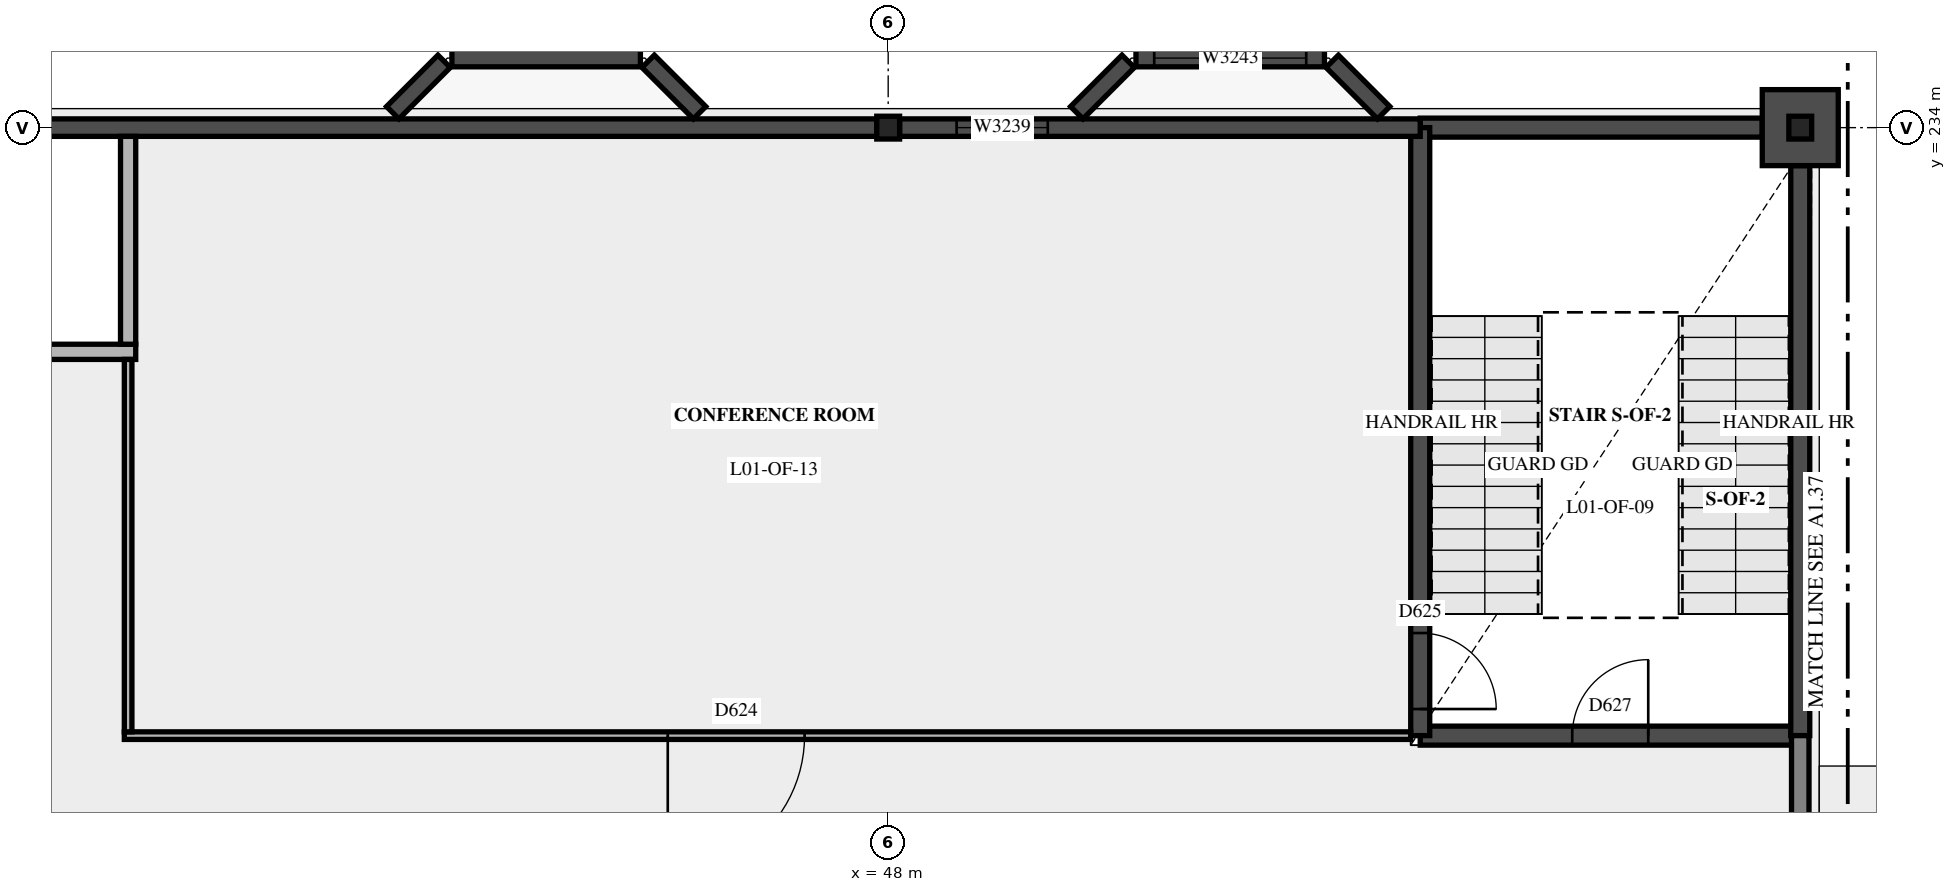
"""IFC4 building model, lengths in metres.
Left out: names, types, materials, properties, quantities, classifications, styles, units other than length and angle.
Written with IfcOpenShell. Run it as: python <this file> out.ifc"""

import sys

from ifc_helpers import new_model, si_unit, direction, frame, frame_2d, origin, origin_2d, place, context, subcontext, project, spatial, rectangle, i_section, extrude, element, fill, save


model = new_model("IFC4")
c1 = context("Model", 3, precision=1e-05, world=origin(), true_north=direction((0.0, 1.0)))
c2 = subcontext(c1, "Body", "Model", "MODEL_VIEW")
j1 = project(units=[si_unit("LENGTHUNIT", "METRE"), si_unit("PLANEANGLEUNIT", "RADIAN")], contexts=[c1])
p1 = place(None, origin())
s1 = spatial("IfcSite", under=j1, at=p1, CompositionType="ELEMENT")
p2 = place(p1, origin())
s2 = spatial("IfcBuilding", under=s1, at=p2, CompositionType="ELEMENT")
p3 = place(p2, frame((0.0, 0.0, 5.4)))
s3 = spatial("IfcBuildingStorey", under=s2, at=p3, CompositionType="ELEMENT", Elevation=5.4)
for number, where, z_axis, x_axis in (
    (1, (48.0, 234.0, 0.0), (0.0, 0.0, 1.0), (1.0, 0.0, 0.0)),
    (2, (60.0, 234.0, 0.0), (0.0, 0.0, 1.0), (1.0, 0.0, 0.0)),
):
    element("IfcColumn", number, at=place(p3, frame(where, z_axis=z_axis, x_axis=x_axis)), inside=s3, PredefinedType="COLUMN", context=c2, shape_type="SweptSolid", body=[
        extrude(i_section(OverallWidth=0.3, OverallDepth=0.3, WebThickness=0.011, FlangeThickness=0.019, at=origin_2d()), origin(), (0.0, 0.0, 1.0), 5.4),
    ])
p4 = place(p3, frame((55.0, 226.0, 0.0), z_axis=(0.0, 0.0, 1.0), x_axis=(1.0, 0.0, 0.0)))
e3 = element("IfcWall", 3, at=p4, inside=s3, PredefinedType="SHEAR", context=c2, shape_type="SweptSolid", body=[
    extrude(rectangle(XDim=5.0, YDim=0.25, at=frame_2d((2.5, 0.0))), origin(), (0.0, 0.0, 1.0), 5.4),
])
p5 = place(p4, frame((2.0, 0.0, 0.0)))
e4 = element("IfcOpeningElement", 4, at=p5, cuts=e3, PredefinedType="OPENING", context=c2, shape_type="SweptSolid", body=[
    extrude(rectangle(XDim=1.0, YDim=2.1, at=frame_2d((0.5, 1.05))), frame((0.0, 0.135, 0.0), z_axis=(0.0, -1.0, 0.0), x_axis=(1.0, 0.0, 0.0)), (0.0, 0.0, 1.0), 0.27),
])
p6 = place(p3, frame((60.0, 226.0, 0.0), z_axis=(0.0, 0.0, 1.0), x_axis=(0.0, 1.0, 0.0)))
e5 = element("IfcWall", 5, at=p6, inside=s3, PredefinedType="SHEAR", context=c2, shape_type="SweptSolid", body=[
    extrude(rectangle(XDim=7.5, YDim=0.25, at=frame_2d((3.75, 0.0))), origin(), (0.0, 0.0, 1.0), 5.4),
])
p7 = place(p3, frame((55.0, 234.0, 0.0), z_axis=(0.0, 0.0, 1.0), x_axis=(1.0, 0.0, 0.0)))
e6 = element("IfcWall", 6, at=p7, inside=s3, PredefinedType="SHEAR", context=c2, shape_type="SweptSolid", body=[
    extrude(rectangle(XDim=4.5, YDim=0.25, at=frame_2d((2.25, 0.0))), origin(), (0.0, 0.0, 1.0), 5.4),
])
p8 = place(p3, frame((55.0, 226.0, 0.0), z_axis=(0.0, 0.0, 1.0), x_axis=(0.0, 1.0, 0.0)))
e7 = element("IfcWall", 7, at=p8, inside=s3, PredefinedType="SHEAR", context=c2, shape_type="SweptSolid", body=[
    extrude(rectangle(XDim=8.0, YDim=0.25, at=frame_2d((4.0, 0.0))), origin(), (0.0, 0.0, 1.0), 5.4),
])
p9 = place(p8, frame((0.35, 0.0, 0.0)))
e8 = element("IfcOpeningElement", 8, at=p9, cuts=e7, PredefinedType="OPENING", context=c2, shape_type="SweptSolid", body=[
    extrude(rectangle(XDim=1.0, YDim=2.1, at=frame_2d((0.5, 1.05))), frame((0.0, 0.135, 0.0), z_axis=(0.0, -1.0, 0.0), x_axis=(1.0, 0.0, 0.0)), (0.0, 0.0, 1.0), 0.27),
])
p10 = place(p3, frame((36.15, 234.0, 0.0), z_axis=(0.0, 0.0, 1.0), x_axis=(1.0, 0.0, 0.0)))
e9 = element("IfcWall", 9, at=p10, inside=s3, PredefinedType="SOLIDWALL", context=c2, shape_type="SweptSolid", body=[
    extrude(rectangle(XDim=11.7, YDim=0.23, at=frame_2d((5.85, 0.0))), origin(), (0.0, 0.0, 1.0), 5.4),
])
p11 = place(p10, frame((6.35, 0.0, 0.75)))
e10 = element("IfcOpeningElement", 10, at=p11, cuts=e9, PredefinedType="OPENING", context=c2, shape_type="SweptSolid", body=[
    extrude(rectangle(XDim=2.0, YDim=2.55, at=frame_2d((1.0, 1.275))), frame((0.0, 0.125, 0.0), z_axis=(0.0, -1.0, 0.0), x_axis=(1.0, 0.0, 0.0)), (0.0, 0.0, 1.0), 0.25),
])
p12 = place(p3, frame((48.15, 234.0, 0.0), z_axis=(0.0, 0.0, 1.0), x_axis=(1.0, 0.0, 0.0)))
e11 = element("IfcWall", 11, at=p12, inside=s3, PredefinedType="SOLIDWALL", context=c2, shape_type="SweptSolid", body=[
    extrude(rectangle(XDim=6.85, YDim=0.23, at=frame_2d((3.425, 0.0))), origin(), (0.0, 0.0, 1.0), 5.4),
])
p13 = place(p12, frame((0.75, 0.0, 0.9)))
e12 = element("IfcOpeningElement", 12, at=p13, cuts=e11, PredefinedType="OPENING", context=c2, shape_type="SweptSolid", body=[
    extrude(rectangle(XDim=1.2, YDim=3.3, at=frame_2d((0.6, 1.65))), frame((0.0, 0.125, 0.0), z_axis=(0.0, -1.0, 0.0), x_axis=(1.0, 0.0, 0.0)), (0.0, 0.0, 1.0), 0.25),
])
p14 = place(p12, frame((3.35, 0.0, 0.75)))
e13 = element("IfcOpeningElement", 13, at=p14, cuts=e11, PredefinedType="OPENING", context=c2, shape_type="SweptSolid", body=[
    extrude(rectangle(XDim=2.0, YDim=2.55, at=frame_2d((1.0, 1.275))), frame((0.0, 0.125, 0.0), z_axis=(0.0, -1.0, 0.0), x_axis=(1.0, 0.0, 0.0)), (0.0, 0.0, 1.0), 0.25),
])
p15 = place(p3, frame((60.0, 222.15, 0.0), z_axis=(0.0, 0.0, 1.0), x_axis=(0.0, 1.0, 0.0)))
e14 = element("IfcWall", 14, at=p15, inside=s3, PredefinedType="SOLIDWALL", context=c2, shape_type="SweptSolid", body=[
    extrude(rectangle(XDim=3.85, YDim=0.23, at=frame_2d((1.925, 0.0))), origin(), (0.0, 0.0, 1.0), 4.7),
])
p16 = place(p3, frame((59.5, 234.0, 0.0), z_axis=(0.0, 0.0, 1.0), x_axis=(1.0, 0.0, 0.0)))
e15 = element("IfcWall", 15, at=p16, inside=s3, PredefinedType="SOLIDWALL", context=c2, shape_type="SweptSolid", body=[
    extrude(rectangle(XDim=1.0, YDim=1.0, at=frame_2d((0.5, 0.0))), origin(), (0.0, 0.0, 1.0), 5.4),
])
p17 = place(p3, frame((41.481, 234.196, 0.75), z_axis=(0.0, 0.0, 1.0), x_axis=(0.707106781187, 0.707106781187, 0.0)))
e16 = element("IfcWall", 16, at=p17, inside=s3, PredefinedType="SOLIDWALL", context=c2, shape_type="SweptSolid", body=[
    extrude(rectangle(XDim=0.956, YDim=0.23, at=frame_2d((0.478, 0.0))), origin(), (0.0, 0.0, 1.0), 2.55),
])
p18 = place(p3, frame((42.26, 234.915, 0.75), z_axis=(0.0, 0.0, 1.0), x_axis=(1.0, 0.0, 0.0)))
e17 = element("IfcWall", 17, at=p18, inside=s3, PredefinedType="SOLIDWALL", context=c2, shape_type="SweptSolid", body=[
    extrude(rectangle(XDim=2.48, YDim=0.23, at=frame_2d((1.24, 0.0))), origin(), (0.0, 0.0, 1.0), 2.55),
])
p19 = place(p3, frame((44.843, 234.873, 0.75), z_axis=(0.0, 0.0, 1.0), x_axis=(0.707106781187, -0.707106781187, 0.0)))
e18 = element("IfcWall", 18, at=p19, inside=s3, PredefinedType="SOLIDWALL", context=c2, shape_type="SweptSolid", body=[
    extrude(rectangle(XDim=0.956, YDim=0.23, at=frame_2d((0.478, 0.0))), origin(), (0.0, 0.0, 1.0), 2.55),
])
for number, where, z_axis, x_axis in (
    (19, (41.45, 234.195, 0.05), (0.0, 0.0, 1.0), (1.0, 0.0, 0.0)),
    (20, (45.05, 234.195, 0.05), (0.0, 0.0, 1.0), (1.0, 0.0, 0.0)),
):
    element("IfcWall", number, at=place(p3, frame(where, z_axis=z_axis, x_axis=x_axis)), inside=s3, PredefinedType="SOLIDWALL", context=c2, shape_type="SweptSolid", body=[
        extrude(rectangle(XDim=0.5, YDim=0.16, at=frame_2d((0.25, 0.0))), origin(), (0.0, 0.0, 1.0), 0.18),
    ])
for number, where, z_axis, x_axis in (
    (21, (41.45, 234.285, 0.23), (0.0, 0.0, 1.0), (1.0, 0.0, 0.0)),
    (22, (45.05, 234.285, 0.23), (0.0, 0.0, 1.0), (1.0, 0.0, 0.0)),
):
    element("IfcWall", number, at=place(p3, frame(where, z_axis=z_axis, x_axis=x_axis)), inside=s3, PredefinedType="SOLIDWALL", context=c2, shape_type="SweptSolid", body=[
        extrude(rectangle(XDim=0.5, YDim=0.34, at=frame_2d((0.25, 0.0))), origin(), (0.0, 0.0, 1.0), 0.18),
    ])
for number, where, z_axis, x_axis in (
    (23, (41.45, 234.365, 0.41), (0.0, 0.0, 1.0), (1.0, 0.0, 0.0)),
    (24, (45.05, 234.365, 0.41), (0.0, 0.0, 1.0), (1.0, 0.0, 0.0)),
):
    element("IfcWall", number, at=place(p3, frame(where, z_axis=z_axis, x_axis=x_axis)), inside=s3, PredefinedType="SOLIDWALL", context=c2, shape_type="SweptSolid", body=[
        extrude(rectangle(XDim=0.5, YDim=0.5, at=frame_2d((0.25, 0.0))), origin(), (0.0, 0.0, 1.0), 0.18),
    ])
p20 = place(p3, frame((50.481, 234.196, 0.75), z_axis=(0.0, 0.0, 1.0), x_axis=(0.707106781187, 0.707106781187, 0.0)))
e25 = element("IfcWall", 25, at=p20, inside=s3, PredefinedType="SOLIDWALL", context=c2, shape_type="SweptSolid", body=[
    extrude(rectangle(XDim=0.956, YDim=0.23, at=frame_2d((0.478, 0.0))), origin(), (0.0, 0.0, 1.0), 2.55),
])
p21 = place(p3, frame((51.26, 234.915, 0.75), z_axis=(0.0, 0.0, 1.0), x_axis=(1.0, 0.0, 0.0)))
e26 = element("IfcWall", 26, at=p21, inside=s3, PredefinedType="SOLIDWALL", context=c2, shape_type="SweptSolid", body=[
    extrude(rectangle(XDim=2.48, YDim=0.23, at=frame_2d((1.24, 0.0))), origin(), (0.0, 0.0, 1.0), 2.55),
])
p22 = place(p21, frame((0.24, 0.0, 0.15)))
e27 = element("IfcOpeningElement", 27, at=p22, cuts=e26, PredefinedType="OPENING", context=c2, shape_type="SweptSolid", body=[
    extrude(rectangle(XDim=2.0, YDim=2.1, at=frame_2d((1.0, 1.05))), frame((0.0, 0.125, 0.0), z_axis=(0.0, -1.0, 0.0), x_axis=(1.0, 0.0, 0.0)), (0.0, 0.0, 1.0), 0.25),
])
p23 = place(p3, frame((53.843, 234.873, 0.75), z_axis=(0.0, 0.0, 1.0), x_axis=(0.707106781187, -0.707106781187, 0.0)))
e28 = element("IfcWall", 28, at=p23, inside=s3, PredefinedType="SOLIDWALL", context=c2, shape_type="SweptSolid", body=[
    extrude(rectangle(XDim=0.956, YDim=0.23, at=frame_2d((0.478, 0.0))), origin(), (0.0, 0.0, 1.0), 2.55),
])
for number, where, z_axis, x_axis in (
    (29, (50.45, 234.195, 0.05), (0.0, 0.0, 1.0), (1.0, 0.0, 0.0)),
    (30, (54.05, 234.195, 0.05), (0.0, 0.0, 1.0), (1.0, 0.0, 0.0)),
):
    element("IfcWall", number, at=place(p3, frame(where, z_axis=z_axis, x_axis=x_axis)), inside=s3, PredefinedType="SOLIDWALL", context=c2, shape_type="SweptSolid", body=[
        extrude(rectangle(XDim=0.5, YDim=0.16, at=frame_2d((0.25, 0.0))), origin(), (0.0, 0.0, 1.0), 0.18),
    ])
for number, where, z_axis, x_axis in (
    (31, (50.45, 234.285, 0.23), (0.0, 0.0, 1.0), (1.0, 0.0, 0.0)),
    (32, (54.05, 234.285, 0.23), (0.0, 0.0, 1.0), (1.0, 0.0, 0.0)),
):
    element("IfcWall", number, at=place(p3, frame(where, z_axis=z_axis, x_axis=x_axis)), inside=s3, PredefinedType="SOLIDWALL", context=c2, shape_type="SweptSolid", body=[
        extrude(rectangle(XDim=0.5, YDim=0.34, at=frame_2d((0.25, 0.0))), origin(), (0.0, 0.0, 1.0), 0.18),
    ])
for number, where, z_axis, x_axis in (
    (33, (50.45, 234.365, 0.41), (0.0, 0.0, 1.0), (1.0, 0.0, 0.0)),
    (34, (54.05, 234.365, 0.41), (0.0, 0.0, 1.0), (1.0, 0.0, 0.0)),
):
    element("IfcWall", number, at=place(p3, frame(where, z_axis=z_axis, x_axis=x_axis)), inside=s3, PredefinedType="SOLIDWALL", context=c2, shape_type="SweptSolid", body=[
        extrude(rectangle(XDim=0.5, YDim=0.5, at=frame_2d((0.25, 0.0))), origin(), (0.0, 0.0, 1.0), 0.18),
    ])
p24 = place(p3, frame((37.95, 226.0, 0.0), z_axis=(0.0, 0.0, 1.0), x_axis=(1.0, 0.0, 0.0)))
e35 = element("IfcWall", 35, at=p24, inside=s3, PredefinedType="PARTITIONING", context=c2, shape_type="SweptSolid", body=[
    extrude(rectangle(XDim=16.925, YDim=0.1, at=frame_2d((8.462, 0.0))), origin(), (0.0, 0.0, 1.0), 4.7),
])
p25 = place(p24, frame((7.15, 0.0, 0.0)))
e36 = element("IfcOpeningElement", 36, at=p25, cuts=e35, PredefinedType="OPENING", context=c2, shape_type="SweptSolid", body=[
    extrude(rectangle(XDim=1.8, YDim=2.1, at=frame_2d((0.9, 1.05))), frame((0.0, 0.06, 0.0), z_axis=(0.0, -1.0, 0.0), x_axis=(1.0, 0.0, 0.0)), (0.0, 0.0, 1.0), 0.12),
])
p26 = place(p3, frame((32.275, 231.05, 0.0), z_axis=(0.0, 0.0, 1.0), x_axis=(1.0, 0.0, 0.0)))
e37 = element("IfcWall", 37, at=p26, inside=s3, PredefinedType="PARTITIONING", context=c2, shape_type="SweptSolid", body=[
    extrude(rectangle(XDim=5.825, YDim=0.2, at=frame_2d((2.913, 0.0))), origin(), (0.0, 0.0, 1.0), 4.7),
])
p27 = place(p26, frame((2.3, 0.0, 0.0)))
e38 = element("IfcOpeningElement", 38, at=p27, cuts=e37, PredefinedType="OPENING", context=c2, shape_type="SweptSolid", body=[
    extrude(rectangle(XDim=1.0, YDim=2.1, at=frame_2d((0.5, 1.05))), frame((0.0, 0.11, 0.0), z_axis=(0.0, -1.0, 0.0), x_axis=(1.0, 0.0, 0.0)), (0.0, 0.0, 1.0), 0.22),
])
p28 = place(p3, frame((38.0, 226.05, 0.0), z_axis=(0.0, 0.0, 1.0), x_axis=(0.0, 1.0, 0.0)))
e39 = element("IfcWall", 39, at=p28, inside=s3, PredefinedType="PARTITIONING", context=c2, shape_type="SweptSolid", body=[
    extrude(rectangle(XDim=4.9, YDim=0.1, at=frame_2d((2.45, 0.0))), origin(), (0.0, 0.0, 1.0), 5.15),
])
p29 = place(p3, frame((38.0, 231.15, 0.0), z_axis=(0.0, 0.0, 1.0), x_axis=(0.0, 1.0, 0.0)))
e40 = element("IfcWall", 40, at=p29, inside=s3, PredefinedType="PARTITIONING", context=c2, shape_type="SweptSolid", body=[
    extrude(rectangle(XDim=2.735, YDim=0.2, at=frame_2d((1.368, 0.0))), origin(), (0.0, 0.0, 1.0), 5.15),
])
p30 = place(p13, origin())
e41 = element("IfcWindow", 41, at=p30, inside=s3, PartitioningType="SINGLE_PANEL", PredefinedType="WINDOW", context=c2, shape_type="SweptSolid", body=[
    extrude(rectangle(XDim=1.2, YDim=3.3, at=frame_2d((0.6, 1.65))), frame((0.0, 0.03, 0.0), z_axis=(0.0, -1.0, 0.0), x_axis=(1.0, 0.0, 0.0)), (0.0, 0.0, 1.0), 0.06),
])
fill(e12, e41)
p31 = place(p22, origin())
e42 = element("IfcWindow", 42, at=p31, inside=s3, PartitioningType="SINGLE_PANEL", PredefinedType="WINDOW", context=c2, shape_type="SweptSolid", body=[
    extrude(rectangle(XDim=2.0, YDim=2.1, at=frame_2d((1.0, 1.05))), frame((0.0, 0.03, 0.0), z_axis=(0.0, -1.0, 0.0), x_axis=(1.0, 0.0, 0.0)), (0.0, 0.0, 1.0), 0.06),
])
fill(e27, e42)
p32 = place(p25, origin())
e43 = element("IfcDoor", 43, at=p32, inside=s3, OperationType="DOUBLE_DOOR_SINGLE_SWING", PredefinedType="DOOR", context=c2, shape_type="SweptSolid", body=[
    extrude(rectangle(XDim=1.8, YDim=2.1, at=frame_2d((0.9, 1.05))), frame((0.0, 0.025, 0.0), z_axis=(0.0, -1.0, 0.0), x_axis=(1.0, 0.0, 0.0)), (0.0, 0.0, 1.0), 0.05),
])
fill(e36, e43)
p33 = place(p9, origin())
e44 = element("IfcDoor", 44, at=p33, inside=s3, OperationType="SINGLE_SWING_RIGHT", PredefinedType="DOOR", context=c2, shape_type="SweptSolid", body=[
    extrude(rectangle(XDim=1.0, YDim=2.1, at=frame_2d((0.5, 1.05))), frame((0.0, 0.025, 0.0), z_axis=(0.0, -1.0, 0.0), x_axis=(1.0, 0.0, 0.0)), (0.0, 0.0, 1.0), 0.05),
])
fill(e8, e44)
p34 = place(p5, origin())
e45 = element("IfcDoor", 45, at=p34, inside=s3, OperationType="SINGLE_SWING_RIGHT", PredefinedType="DOOR", context=c2, shape_type="SweptSolid", body=[
    extrude(rectangle(XDim=1.0, YDim=2.1, at=frame_2d((0.5, 1.05))), frame((0.0, 0.025, 0.0), z_axis=(0.0, -1.0, 0.0), x_axis=(1.0, 0.0, 0.0)), (0.0, 0.0, 1.0), 0.05),
])
fill(e4, e45)
save(model, sys.argv[1])
